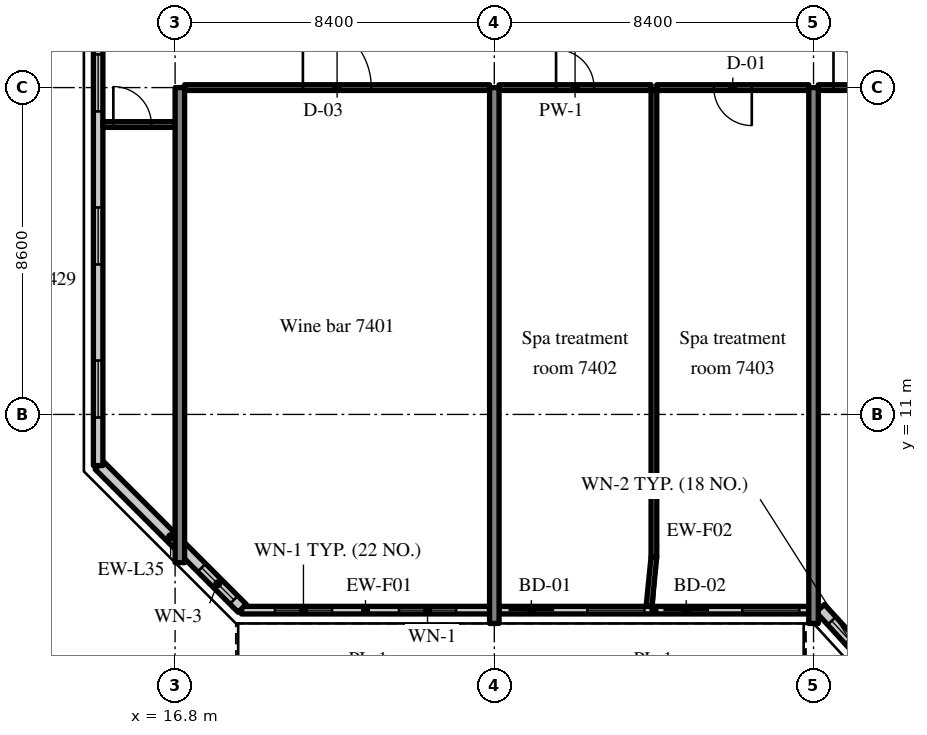
"""IFC4 building model, lengths in metres.
Left out: names, types, materials, properties, quantities, classifications, styles, units other than length and angle.
Written with IfcOpenShell. Run it as: python <this file> out.ifc"""

import sys

from ifc_helpers import new_model, si_unit, direction, frame, frame_2d, origin, place, context, subcontext, project, spatial, rectangle, extrude, source, transform, mapped, element, fill, save


model = new_model("IFC4")
c1 = context("Model", 3, precision=1e-05, world=origin(), true_north=direction((0.0, 1.0)))
c2 = subcontext(c1, "Body", "Model", "MODEL_VIEW")
j1 = project(units=[si_unit("LENGTHUNIT", "METRE"), si_unit("PLANEANGLEUNIT", "RADIAN")], contexts=[c1])
p1 = place(None, origin())
s1 = spatial("IfcSite", under=j1, at=p1, CompositionType="ELEMENT")
p2 = place(p1, origin())
s2 = spatial("IfcBuilding", under=s1, at=p2, CompositionType="ELEMENT")
p3 = place(p2, frame((0.0, 0.0, 309.7)))
s3 = spatial("IfcBuildingStorey", under=s2, at=p3, CompositionType="ELEMENT", Elevation=309.7)
m1 = source(origin(), c2, "Body", "SweptSolid", [
    extrude(rectangle(XDim=12.5, YDim=0.25, at=frame_2d((6.25, 0.0))), origin(), (0.0, 0.0, 1.0), 3.72),
])
p4 = place(p3, frame((16.925, 7.1, 0.0), z_axis=(0.0, 0.0, 1.0), x_axis=(0.0, 1.0, 0.0)))
e1 = element("IfcWall", 1, at=p4, inside=s3, PredefinedType="SHEAR", context=c2, shape_type="MappedRepresentation", body=[
    mapped(m1, transform((0.0, 0.0, 0.0), scale=1.0)),
])
m2 = source(origin(), c2, "Body", "SweptSolid", [
    extrude(rectangle(XDim=14.1, YDim=0.25, at=frame_2d((7.05, 0.0))), origin(), (0.0, 0.0, 1.0), 3.72),
])
for number, where, z_axis, x_axis in (
    (2, (25.2, 5.5, 0.0), (0.0, 0.0, 1.0), (0.0, 1.0, 0.0)),
    (3, (33.6, 5.5, 0.0), (0.0, 0.0, 1.0), (0.0, 1.0, 0.0)),
):
    element("IfcWall", number, at=place(p3, frame(where, z_axis=z_axis, x_axis=x_axis)), inside=s3, PredefinedType="SHEAR", context=c2, shape_type="MappedRepresentation", body=[
        mapped(m2, transform((0.0, 0.0, 0.0), scale=1.0)),
    ])
m3 = source(origin(), c2, "Body", "SweptSolid", [
    extrude(rectangle(XDim=6.53, YDim=0.2, at=frame_2d((3.265, 0.0))), origin(), (0.0, 0.0, 1.0), 3.17),
])
p5 = place(p3, frame((18.545, 5.85, 0.0), z_axis=(0.0, 0.0, 1.0), x_axis=(1.0, 0.0, 0.0)))
e4 = element("IfcWall", 4, at=p5, inside=s3, PredefinedType="SOLIDWALL", context=c2, shape_type="MappedRepresentation", body=[
    mapped(m3, transform((0.0, 0.0, 0.0), scale=1.0)),
])
m4 = source(origin(), c2, "Body", "SweptSolid", [
    extrude(rectangle(XDim=1.5, YDim=1.5, at=frame_2d((0.75, 0.75))), frame((0.0, 0.11, 0.0), z_axis=(0.0, -1.0, 0.0), x_axis=(1.0, 0.0, 0.0)), (0.0, 0.0, 1.0), 0.22),
])
p6 = place(p5, frame((0.883, 0.0, 0.9)))
e5 = element("IfcOpeningElement", 5, at=p6, cuts=e4, PredefinedType="OPENING", context=c2, shape_type="MappedRepresentation", body=[
    mapped(m4, transform((0.0, 0.0, 0.0), scale=1.0)),
])
p7 = place(p5, frame((4.147, 0.0, 0.9)))
e6 = element("IfcOpeningElement", 6, at=p7, cuts=e4, PredefinedType="OPENING", context=c2, shape_type="MappedRepresentation", body=[
    mapped(m4, transform((0.0, 0.0, 0.0), scale=1.0)),
])
m5 = source(origin(), c2, "Body", "SweptSolid", [
    extrude(rectangle(XDim=8.15, YDim=0.2, at=frame_2d((4.075, 0.0))), origin(), (0.0, 0.0, 1.0), 3.17),
])
p8 = place(p3, frame((25.325, 5.85, 0.0), z_axis=(0.0, 0.0, 1.0), x_axis=(1.0, 0.0, 0.0)))
e7 = element("IfcWall", 7, at=p8, inside=s3, PredefinedType="SOLIDWALL", context=c2, shape_type="MappedRepresentation", body=[
    mapped(m5, transform((0.0, 0.0, 0.0), scale=1.0)),
])
m6 = source(origin(), c2, "Body", "SweptSolid", [
    extrude(rectangle(XDim=1.2, YDim=2.4, at=frame_2d((0.6, 1.2))), frame((0.0, 0.11, 0.0), z_axis=(0.0, -1.0, 0.0), x_axis=(1.0, 0.0, 0.0)), (0.0, 0.0, 1.0), 0.22),
])
p9 = place(p8, frame((0.25, 0.0, 0.0)))
e8 = element("IfcOpeningElement", 8, at=p9, cuts=e7, PredefinedType="OPENING", context=c2, shape_type="MappedRepresentation", body=[
    mapped(m6, transform((0.0, 0.0, 0.0), scale=1.0)),
])
p10 = place(p8, frame((2.325, 0.0, 0.9)))
e9 = element("IfcOpeningElement", 9, at=p10, cuts=e7, PredefinedType="OPENING", context=c2, shape_type="MappedRepresentation", body=[
    mapped(m4, transform((0.0, 0.0, 0.0), scale=1.0)),
])
p11 = place(p8, frame((4.325, 0.0, 0.0)))
e10 = element("IfcOpeningElement", 10, at=p11, cuts=e7, PredefinedType="OPENING", context=c2, shape_type="MappedRepresentation", body=[
    mapped(m6, transform((0.0, 0.0, 0.0), scale=1.0)),
])
p12 = place(p8, frame((6.4, 0.0, 0.9)))
e11 = element("IfcOpeningElement", 11, at=p12, cuts=e7, PredefinedType="OPENING", context=c2, shape_type="MappedRepresentation", body=[
    mapped(m4, transform((0.0, 0.0, 0.0), scale=1.0)),
])
m7 = source(origin(), c2, "Body", "SweptSolid", [
    extrude(rectangle(XDim=2.398, YDim=0.3, at=frame_2d((1.199, 0.0))), origin(), (0.0, 0.0, 1.0), 3.72),
])
p13 = place(p3, frame((33.776, 5.9, 0.0), z_axis=(0.0, 0.0, 1.0), x_axis=(0.675374189419, -0.737475222815, 0.0)))
e12 = element("IfcWall", 12, at=p13, inside=s3, PredefinedType="SOLIDWALL", context=c2, shape_type="MappedRepresentation", body=[
    mapped(m7, transform((0.0, 0.0, 0.0), scale=1.0)),
])
m8 = source(origin(), c2, "Body", "SweptSolid", [
    extrude(rectangle(XDim=1.5, YDim=2.0, at=frame_2d((0.75, 1.0))), frame((0.0, 0.16, 0.0), z_axis=(0.0, -1.0, 0.0), x_axis=(1.0, 0.0, 0.0)), (0.0, 0.0, 1.0), 0.32),
])
p14 = place(p13, frame((0.449, 0.0, 0.9)))
e13 = element("IfcOpeningElement", 13, at=p14, cuts=e12, PredefinedType="OPENING", context=c2, shape_type="MappedRepresentation", body=[
    mapped(m8, transform((0.0, 0.0, 0.0), scale=1.0)),
])
m9 = source(origin(), c2, "Body", "SweptSolid", [
    extrude(rectangle(XDim=5.326, YDim=0.3, at=frame_2d((2.663, 0.0))), origin(), (0.0, 0.0, 1.0), 3.72),
])
p15 = place(p3, frame((14.8, 9.666, 0.0), z_axis=(0.0, 0.0, 1.0), x_axis=(0.707083859269, -0.707129702361, 0.0)))
e14 = element("IfcWall", 14, at=p15, inside=s3, PredefinedType="SOLIDWALL", context=c2, shape_type="MappedRepresentation", body=[
    mapped(m9, transform((0.0, 0.0, 0.0), scale=1.0)),
])
m10 = source(origin(), c2, "Body", "SweptSolid", [
    extrude(rectangle(XDim=1.2, YDim=1.5, at=frame_2d((0.6, 0.75))), frame((0.0, 0.16, 0.0), z_axis=(0.0, -1.0, 0.0), x_axis=(1.0, 0.0, 0.0)), (0.0, 0.0, 1.0), 0.32),
])
p16 = place(p15, frame((3.815, 0.0, 0.9)))
e15 = element("IfcOpeningElement", 15, at=p16, cuts=e14, PredefinedType="OPENING", context=c2, shape_type="MappedRepresentation", body=[
    mapped(m10, transform((0.0, 0.0, 0.0), scale=1.0)),
])
m11 = source(origin(), c2, "Body", "SweptSolid", [
    extrude(rectangle(XDim=28.189, YDim=0.25, at=frame_2d((14.095, 0.0))), origin(), (0.0, 0.0, 1.0), 3.72),
])
p17 = place(p3, frame((14.775, 37.845, 0.0), z_axis=(0.0, 0.0, 1.0), x_axis=(0.0, -1.0, 0.0)))
e16 = element("IfcWall", 16, at=p17, inside=s3, PredefinedType="SOLIDWALL", context=c2, shape_type="MappedRepresentation", body=[
    mapped(m11, transform((0.0, 0.0, 0.0), scale=1.0)),
])
m12 = source(origin(), c2, "Body", "SweptSolid", [
    extrude(rectangle(XDim=1.5, YDim=1.5, at=frame_2d((0.75, 0.75))), frame((0.0, 0.135, 0.0), z_axis=(0.0, -1.0, 0.0), x_axis=(1.0, 0.0, 0.0)), (0.0, 0.0, 1.0), 0.27),
])
p18 = place(p17, frame((1.263, 0.0, 0.9)))
e17 = element("IfcOpeningElement", 17, at=p18, cuts=e16, PredefinedType="OPENING", context=c2, shape_type="MappedRepresentation", body=[
    mapped(m12, transform((0.0, 0.0, 0.0), scale=1.0)),
])
p19 = place(p17, frame((5.291, 0.0, 0.9)))
e18 = element("IfcOpeningElement", 18, at=p19, cuts=e16, PredefinedType="OPENING", context=c2, shape_type="MappedRepresentation", body=[
    mapped(m12, transform((0.0, 0.0, 0.0), scale=1.0)),
])
p20 = place(p17, frame((9.318, 0.0, 0.9)))
e19 = element("IfcOpeningElement", 19, at=p20, cuts=e16, PredefinedType="OPENING", context=c2, shape_type="MappedRepresentation", body=[
    mapped(m12, transform((0.0, 0.0, 0.0), scale=1.0)),
])
p21 = place(p17, frame((13.345, 0.0, 0.9)))
e20 = element("IfcOpeningElement", 20, at=p21, cuts=e16, PredefinedType="OPENING", context=c2, shape_type="MappedRepresentation", body=[
    mapped(m12, transform((0.0, 0.0, 0.0), scale=1.0)),
])
p22 = place(p17, frame((17.372, 0.0, 0.9)))
e21 = element("IfcOpeningElement", 21, at=p22, cuts=e16, PredefinedType="OPENING", context=c2, shape_type="MappedRepresentation", body=[
    mapped(m12, transform((0.0, 0.0, 0.0), scale=1.0)),
])
p23 = place(p17, frame((21.399, 0.0, 0.9)))
e22 = element("IfcOpeningElement", 22, at=p23, cuts=e16, PredefinedType="OPENING", context=c2, shape_type="MappedRepresentation", body=[
    mapped(m12, transform((0.0, 0.0, 0.0), scale=1.0)),
])
p24 = place(p17, frame((25.426, 0.0, 0.9)))
e23 = element("IfcOpeningElement", 23, at=p24, cuts=e16, PredefinedType="OPENING", context=c2, shape_type="MappedRepresentation", body=[
    mapped(m12, transform((0.0, 0.0, 0.0), scale=1.0)),
])
m13 = source(origin(), c2, "Body", "SweptSolid", [
    extrude(rectangle(XDim=8.025, YDim=0.15, at=frame_2d((4.012, 0.0))), origin(), (0.0, 0.0, 1.0), 3.02),
])
p25 = place(p3, frame((17.05, 19.6, 0.0), z_axis=(0.0, 0.0, 1.0), x_axis=(1.0, 0.0, 0.0)))
e24 = element("IfcWall", 24, at=p25, inside=s3, PredefinedType="PARTITIONING", context=c2, shape_type="MappedRepresentation", body=[
    mapped(m13, transform((0.0, 0.0, 0.0), scale=1.0)),
])
m14 = source(origin(), c2, "Body", "SweptSolid", [
    extrude(rectangle(XDim=1.8, YDim=2.1, at=frame_2d((0.9, 1.05))), frame((0.0, 0.085, 0.0), z_axis=(0.0, -1.0, 0.0), x_axis=(1.0, 0.0, 0.0)), (0.0, 0.0, 1.0), 0.17),
])
p26 = place(p25, frame((3.113, 0.0, 0.0)))
e25 = element("IfcOpeningElement", 25, at=p26, cuts=e24, PredefinedType="OPENING", context=c2, shape_type="MappedRepresentation", body=[
    mapped(m14, transform((0.0, 0.0, 0.0), scale=1.0)),
])
m15 = source(origin(), c2, "Body", "SweptSolid", [
    extrude(rectangle(XDim=4.0, YDim=0.15, at=frame_2d((2.0, 0.0))), origin(), (0.0, 0.0, 1.0), 3.02),
])
p27 = place(p3, frame((25.325, 19.6, 0.0), z_axis=(0.0, 0.0, 1.0), x_axis=(1.0, 0.0, 0.0)))
e26 = element("IfcWall", 26, at=p27, inside=s3, PredefinedType="PARTITIONING", context=c2, shape_type="MappedRepresentation", body=[
    mapped(m15, transform((0.0, 0.0, 0.0), scale=1.0)),
])
m16 = source(origin(), c2, "Body", "SweptSolid", [
    extrude(rectangle(XDim=1.0, YDim=2.1, at=frame_2d((0.5, 1.05))), frame((0.0, 0.085, 0.0), z_axis=(0.0, -1.0, 0.0), x_axis=(1.0, 0.0, 0.0)), (0.0, 0.0, 1.0), 0.17),
])
p28 = place(p27, frame((1.5, 0.0, 0.0)))
e27 = element("IfcOpeningElement", 27, at=p28, cuts=e26, PredefinedType="OPENING", context=c2, shape_type="MappedRepresentation", body=[
    mapped(m16, transform((0.0, 0.0, 0.0), scale=1.0)),
])
p29 = place(p3, frame((29.475, 19.6, 0.0), z_axis=(0.0, 0.0, 1.0), x_axis=(1.0, 0.0, 0.0)))
e28 = element("IfcWall", 28, at=p29, inside=s3, PredefinedType="PARTITIONING", context=c2, shape_type="MappedRepresentation", body=[
    mapped(m15, transform((0.0, 0.0, 0.0), scale=1.0)),
])
p30 = place(p29, frame((1.5, 0.0, 0.0)))
e29 = element("IfcOpeningElement", 29, at=p30, cuts=e28, PredefinedType="OPENING", context=c2, shape_type="MappedRepresentation", body=[
    mapped(m16, transform((0.0, 0.0, 0.0), scale=1.0)),
])
m17 = source(origin(), c2, "Body", "SweptSolid", [
    extrude(rectangle(XDim=12.275, YDim=0.15, at=frame_2d((6.137, 0.0))), origin(), (0.0, 0.0, 1.0), 3.72),
])
p31 = place(p3, frame((29.4, 7.25, 0.0), z_axis=(0.0, 0.0, 1.0), x_axis=(0.0, 1.0, 0.0)))
e30 = element("IfcWall", 30, at=p31, inside=s3, PredefinedType="PARTITIONING", context=c2, shape_type="MappedRepresentation", body=[
    mapped(m17, transform((0.0, 0.0, 0.0), scale=1.0)),
])
m18 = source(origin(), c2, "Body", "SweptSolid", [
    extrude(rectangle(XDim=8.15, YDim=0.15, at=frame_2d((4.075, 0.0))), origin(), (0.0, 0.0, 1.0), 3.02),
])
p32 = place(p3, frame((33.725, 19.6, 0.0), z_axis=(0.0, 0.0, 1.0), x_axis=(1.0, 0.0, 0.0)))
e31 = element("IfcWall", 31, at=p32, inside=s3, PredefinedType="PARTITIONING", context=c2, shape_type="MappedRepresentation", body=[
    mapped(m18, transform((0.0, 0.0, 0.0), scale=1.0)),
])
p33 = place(p32, frame((0.4, 0.0, 0.0)))
e32 = element("IfcOpeningElement", 32, at=p33, cuts=e31, PredefinedType="OPENING", context=c2, shape_type="MappedRepresentation", body=[
    mapped(m16, transform((0.0, 0.0, 0.0), scale=1.0)),
])
m19 = source(origin(), c2, "Body", "SweptSolid", [
    extrude(rectangle(XDim=1.9, YDim=0.15, at=frame_2d((0.95, 0.0))), origin(), (0.0, 0.0, 1.0), 3.02),
])
p34 = place(p3, frame((14.9, 18.628, 0.0), z_axis=(0.0, 0.0, 1.0), x_axis=(1.0, 0.0, 0.0)))
e33 = element("IfcWall", 33, at=p34, inside=s3, PredefinedType="PARTITIONING", context=c2, shape_type="MappedRepresentation", body=[
    mapped(m19, transform((0.0, 0.0, 0.0), scale=1.0)),
])
p35 = place(p34, frame((0.275, 0.0, 0.0)))
e34 = element("IfcOpeningElement", 34, at=p35, cuts=e33, PredefinedType="OPENING", context=c2, shape_type="MappedRepresentation", body=[
    mapped(m16, transform((0.0, 0.0, 0.0), scale=1.0)),
])
m20 = source(origin(), c2, "Body", "SweptSolid", [
    extrude(rectangle(XDim=1.307, YDim=0.15, at=frame_2d((0.653, 0.0))), origin(), (0.0, 0.0, 1.0), 3.72),
])
p36 = place(p3, frame((29.27, 5.95, 0.0), z_axis=(0.0, 0.0, 1.0), x_axis=(0.099411212066, 0.995046436562, 0.0)))
e35 = element("IfcWall", 35, at=p36, inside=s3, PredefinedType="PARTITIONING", context=c2, shape_type="MappedRepresentation", body=[
    mapped(m20, transform((0.0, 0.0, 0.0), scale=1.0)),
])
m21 = source(origin(), c2, "Body", "SweptSolid", [
    extrude(rectangle(XDim=1.5, YDim=1.5, at=frame_2d((0.75, 0.75))), frame((0.0, 0.03, 0.0), z_axis=(0.0, -1.0, 0.0), x_axis=(1.0, 0.0, 0.0)), (0.0, 0.0, 1.0), 0.06),
])
p37 = place(p6, origin())
e36 = element("IfcWindow", 36, at=p37, inside=s3, PartitioningType="SINGLE_PANEL", PredefinedType="WINDOW", context=c2, shape_type="MappedRepresentation", body=[
    mapped(m21, transform((0.0, 0.0, 0.0), scale=1.0)),
])
fill(e5, e36)
p38 = place(p7, origin())
e37 = element("IfcWindow", 37, at=p38, inside=s3, PartitioningType="SINGLE_PANEL", PredefinedType="WINDOW", context=c2, shape_type="MappedRepresentation", body=[
    mapped(m21, transform((0.0, 0.0, 0.0), scale=1.0)),
])
fill(e6, e37)
m22 = source(origin(), c2, "Body", "SweptSolid", [
    extrude(rectangle(XDim=1.2, YDim=2.4, at=frame_2d((0.6, 1.2))), frame((0.0, 0.025, 0.0), z_axis=(0.0, -1.0, 0.0), x_axis=(1.0, 0.0, 0.0)), (0.0, 0.0, 1.0), 0.05),
])
p39 = place(p9, origin())
e38 = element("IfcDoor", 38, at=p39, inside=s3, OperationType="SLIDING_TO_LEFT", PredefinedType="DOOR", context=c2, shape_type="MappedRepresentation", body=[
    mapped(m22, transform((0.0, 0.0, 0.0), scale=1.0)),
])
fill(e8, e38)
p40 = place(p10, origin())
e39 = element("IfcWindow", 39, at=p40, inside=s3, PartitioningType="SINGLE_PANEL", PredefinedType="WINDOW", context=c2, shape_type="MappedRepresentation", body=[
    mapped(m21, transform((0.0, 0.0, 0.0), scale=1.0)),
])
fill(e9, e39)
p41 = place(p11, origin())
e40 = element("IfcDoor", 40, at=p41, inside=s3, OperationType="SLIDING_TO_RIGHT", PredefinedType="DOOR", context=c2, shape_type="MappedRepresentation", body=[
    mapped(m22, transform((0.0, 0.0, 0.0), scale=1.0)),
])
fill(e10, e40)
p42 = place(p12, origin())
e41 = element("IfcWindow", 41, at=p42, inside=s3, PartitioningType="SINGLE_PANEL", PredefinedType="WINDOW", context=c2, shape_type="MappedRepresentation", body=[
    mapped(m21, transform((0.0, 0.0, 0.0), scale=1.0)),
])
fill(e11, e41)
m23 = source(origin(), c2, "Body", "SweptSolid", [
    extrude(rectangle(XDim=1.5, YDim=2.0, at=frame_2d((0.75, 1.0))), frame((0.0, 0.03, 0.0), z_axis=(0.0, -1.0, 0.0), x_axis=(1.0, 0.0, 0.0)), (0.0, 0.0, 1.0), 0.06),
])
p43 = place(p14, origin())
e42 = element("IfcWindow", 42, at=p43, inside=s3, PartitioningType="SINGLE_PANEL", PredefinedType="WINDOW", context=c2, shape_type="MappedRepresentation", body=[
    mapped(m23, transform((0.0, 0.0, 0.0), scale=1.0)),
])
fill(e13, e42)
m24 = source(origin(), c2, "Body", "SweptSolid", [
    extrude(rectangle(XDim=1.2, YDim=1.5, at=frame_2d((0.6, 0.75))), frame((0.0, 0.03, 0.0), z_axis=(0.0, -1.0, 0.0), x_axis=(1.0, 0.0, 0.0)), (0.0, 0.0, 1.0), 0.06),
])
p44 = place(p16, origin())
e43 = element("IfcWindow", 43, at=p44, inside=s3, PartitioningType="SINGLE_PANEL", PredefinedType="WINDOW", context=c2, shape_type="MappedRepresentation", body=[
    mapped(m24, transform((0.0, 0.0, 0.0), scale=1.0)),
])
fill(e15, e43)
p45 = place(p22, origin())
e44 = element("IfcWindow", 44, at=p45, inside=s3, PartitioningType="SINGLE_PANEL", PredefinedType="WINDOW", context=c2, shape_type="MappedRepresentation", body=[
    mapped(m21, transform((0.0, 0.0, 0.0), scale=1.0)),
])
fill(e21, e44)
p46 = place(p23, origin())
e45 = element("IfcWindow", 45, at=p46, inside=s3, PartitioningType="SINGLE_PANEL", PredefinedType="WINDOW", context=c2, shape_type="MappedRepresentation", body=[
    mapped(m21, transform((0.0, 0.0, 0.0), scale=1.0)),
])
fill(e22, e45)
p47 = place(p24, origin())
e46 = element("IfcWindow", 46, at=p47, inside=s3, PartitioningType="SINGLE_PANEL", PredefinedType="WINDOW", context=c2, shape_type="MappedRepresentation", body=[
    mapped(m21, transform((0.0, 0.0, 0.0), scale=1.0)),
])
fill(e23, e46)
m25 = source(origin(), c2, "Body", "SweptSolid", [
    extrude(rectangle(XDim=1.8, YDim=2.1, at=frame_2d((0.9, 1.05))), frame((0.0, 0.025, 0.0), z_axis=(0.0, -1.0, 0.0), x_axis=(1.0, 0.0, 0.0)), (0.0, 0.0, 1.0), 0.05),
])
p48 = place(p26, origin())
e47 = element("IfcDoor", 47, at=p48, inside=s3, OperationType="DOUBLE_DOOR_SINGLE_SWING", PredefinedType="DOOR", context=c2, shape_type="MappedRepresentation", body=[
    mapped(m25, transform((0.0, 0.0, 0.0), scale=1.0)),
])
fill(e25, e47)
m26 = source(origin(), c2, "Body", "SweptSolid", [
    extrude(rectangle(XDim=1.0, YDim=2.1, at=frame_2d((0.5, 1.05))), frame((0.0, 0.025, 0.0), z_axis=(0.0, -1.0, 0.0), x_axis=(1.0, 0.0, 0.0)), (0.0, 0.0, 1.0), 0.05),
])
p49 = place(p28, origin())
e48 = element("IfcDoor", 48, at=p49, inside=s3, OperationType="SINGLE_SWING_LEFT", PredefinedType="DOOR", context=c2, shape_type="MappedRepresentation", body=[
    mapped(m26, transform((0.0, 0.0, 0.0), scale=1.0)),
])
fill(e27, e48)
p50 = place(p30, origin())
e49 = element("IfcDoor", 49, at=p50, inside=s3, OperationType="SINGLE_SWING_RIGHT", PredefinedType="DOOR", context=c2, shape_type="MappedRepresentation", body=[
    mapped(m26, transform((0.0, 0.0, 0.0), scale=1.0)),
])
fill(e29, e49)
p51 = place(p33, origin())
e50 = element("IfcDoor", 50, at=p51, inside=s3, OperationType="SINGLE_SWING_LEFT", PredefinedType="DOOR", context=c2, shape_type="MappedRepresentation", body=[
    mapped(m26, transform((0.0, 0.0, 0.0), scale=1.0)),
])
fill(e32, e50)
p52 = place(p35, origin())
e51 = element("IfcDoor", 51, at=p52, inside=s3, OperationType="SINGLE_SWING_LEFT", PredefinedType="DOOR", context=c2, shape_type="MappedRepresentation", body=[
    mapped(m26, transform((0.0, 0.0, 0.0), scale=1.0)),
])
fill(e34, e51)
save(model, sys.argv[1])
